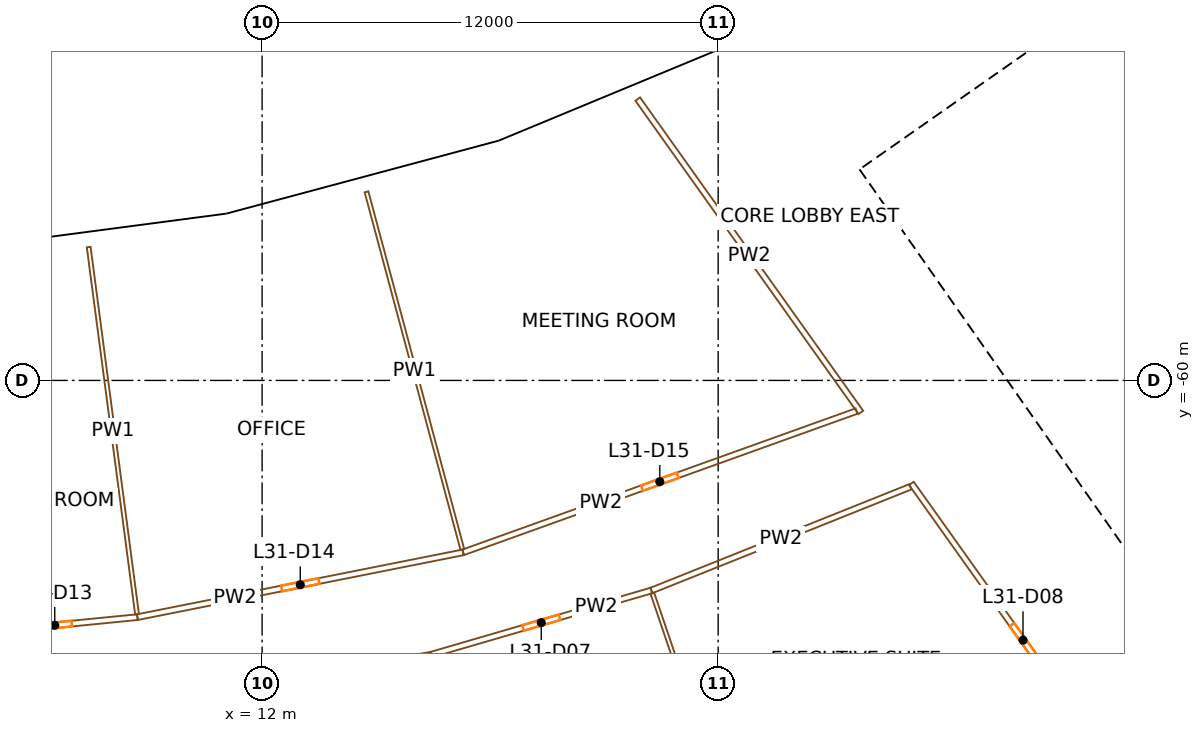
"""IFC4 building model, lengths in metres.
Left out: names, types, materials, properties, quantities, classifications, styles, units other than length and angle.
Written with IfcOpenShell. Run it as: python <this file> out.ifc"""

import sys

from ifc_helpers import new_model, si_unit, direction, frame, frame_2d, origin, origin_2d, place, context, subcontext, project, spatial, rectangle, extrude, element, fill, save


model = new_model("IFC4")
c1 = context("Model", 3, precision=1e-05, world=origin(), true_north=direction((0.0, 1.0)))
c2 = subcontext(c1, "Body", "Model", "MODEL_VIEW")
j1 = project(units=[si_unit("LENGTHUNIT", "METRE"), si_unit("PLANEANGLEUNIT", "RADIAN")], contexts=[c1])
p1 = place(None, origin())
s1 = spatial("IfcSite", under=j1, at=p1, CompositionType="ELEMENT")
p2 = place(p1, origin())
s2 = spatial("IfcBuilding", under=s1, at=p2, CompositionType="ELEMENT")
p3 = place(p2, frame((0.0, 0.0, 136.7)))
s3 = spatial("IfcBuildingStorey", under=s2, at=p3, CompositionType="ELEMENT", Elevation=136.7)
for number, where, z_axis, x_axis in (
    (1, (11.364, -57.131, 0.0), (0.0, 0.0, 1.0), (0.981, 0.195, 0.0)),
    (2, (18.724, -55.159, 0.0), (0.0, 0.0, 1.0), (0.947, 0.321, 0.0)),
    (3, (25.763, -52.243, 0.0), (0.0, 0.0, 1.0), (0.897, 0.442, 0.0)),
):
    element("IfcColumn", number, at=place(p3, frame(where, z_axis=z_axis, x_axis=x_axis)), inside=s3, PredefinedType="COLUMN", context=c2, shape_type="SweptSolid", body=[
        extrude(rectangle(XDim=1.2, YDim=1.5, at=origin_2d()), origin(), (0.0, 0.0, 1.0), 3.8),
    ])
p4 = place(p3, frame((36.717, -66.337, 0.0), z_axis=(0.0, 0.0, 1.0), x_axis=(-0.573577477574, 0.819151315216, 0.0)))
e4 = element("IfcWall", 4, at=p4, inside=s3, PredefinedType="SHEAR", context=c2, shape_type="SweptSolid", body=[
    extrude(rectangle(XDim=14.8, YDim=0.9, at=frame_2d((7.4, 0.0))), origin(), (0.0, 0.0, 1.0), 3.5),
])
p5 = place(p4, frame((6.2, 0.0, 0.0)))
e5 = element("IfcOpeningElement", 5, at=p5, cuts=e4, PredefinedType="OPENING", context=c2, shape_type="SweptSolid", body=[
    extrude(rectangle(XDim=2.4, YDim=2.1, at=frame_2d((1.2, 1.05))), frame((0.0, 0.46, 0.0), z_axis=(0.0, -1.0, 0.0), x_axis=(1.0, 0.0, 0.0)), (0.0, 0.0, 1.0), 0.92),
])
p6 = place(p3, frame((28.854, -54.324, 0.0), z_axis=(0.0, 0.0, 1.0), x_axis=(0.819145767589, 0.573585400304, 0.0)))
e6 = element("IfcWall", 6, at=p6, inside=s3, PredefinedType="SHEAR", context=c2, shape_type="SweptSolid", body=[
    extrude(rectangle(XDim=15.045, YDim=0.9, at=frame_2d((7.523, 0.0))), origin(), (0.0, 0.0, 1.0), 3.5),
])
p7 = place(p6, frame((0.5, 0.0, 0.0)))
e7 = element("IfcOpeningElement", 7, at=p7, cuts=e6, PredefinedType="OPENING", context=c2, shape_type="SweptSolid", body=[
    extrude(rectangle(XDim=1.0, YDim=2.1, at=frame_2d((0.5, 1.05))), frame((0.0, 0.46, 0.0), z_axis=(0.0, -1.0, 0.0), x_axis=(1.0, 0.0, 0.0)), (0.0, 0.0, 1.0), 0.92),
])
p8 = place(p6, frame((2.625, 0.0, 0.0)))
e8 = element("IfcOpeningElement", 8, at=p8, cuts=e6, PredefinedType="OPENING", context=c2, shape_type="SweptSolid", body=[
    extrude(rectangle(XDim=1.0, YDim=2.1, at=frame_2d((0.5, 1.05))), frame((0.0, 0.46, 0.0), z_axis=(0.0, -1.0, 0.0), x_axis=(1.0, 0.0, 0.0)), (0.0, 0.0, 1.0), 0.92),
])
p9 = place(p6, frame((5.625, 0.0, 0.0)))
e9 = element("IfcOpeningElement", 9, at=p9, cuts=e6, PredefinedType="OPENING", context=c2, shape_type="SweptSolid", body=[
    extrude(rectangle(XDim=0.9, YDim=2.1, at=frame_2d((0.45, 1.05))), frame((0.0, 0.46, 0.0), z_axis=(0.0, -1.0, 0.0), x_axis=(1.0, 0.0, 0.0)), (0.0, 0.0, 1.0), 0.92),
])
p10 = place(p6, frame((13.495, 0.0, 0.0)))
e10 = element("IfcOpeningElement", 10, at=p10, cuts=e6, PredefinedType="OPENING", context=c2, shape_type="SweptSolid", body=[
    extrude(rectangle(XDim=1.1, YDim=2.1, at=frame_2d((0.55, 1.05))), frame((0.0, 0.46, 0.0), z_axis=(0.0, -1.0, 0.0), x_axis=(1.0, 0.0, 0.0)), (0.0, 0.0, 1.0), 0.92),
])
p11 = place(p3, frame((31.895, -58.666, 0.0), z_axis=(0.0, 0.0, 1.0), x_axis=(0.819166993208, 0.573555086491, 0.0)))
e11 = element("IfcWall", 11, at=p11, inside=s3, PredefinedType="SOLIDWALL", context=c2, shape_type="SweptSolid", body=[
    extrude(rectangle(XDim=7.95, YDim=0.3, at=frame_2d((3.975, 0.0))), origin(), (0.0, 0.0, 1.0), 3.5),
])
p12 = place(p11, frame((0.675, 0.0, 0.0)))
e12 = element("IfcOpeningElement", 12, at=p12, cuts=e11, PredefinedType="OPENING", context=c2, shape_type="SweptSolid", body=[
    extrude(rectangle(XDim=1.1, YDim=2.1, at=frame_2d((0.55, 1.05))), frame((0.0, 0.16, 0.0), z_axis=(0.0, -1.0, 0.0), x_axis=(1.0, 0.0, 0.0)), (0.0, 0.0, 1.0), 0.32),
])
p13 = place(p11, frame((3.425, 0.0, 0.0)))
e13 = element("IfcOpeningElement", 13, at=p13, cuts=e11, PredefinedType="OPENING", context=c2, shape_type="SweptSolid", body=[
    extrude(rectangle(XDim=1.1, YDim=2.1, at=frame_2d((0.55, 1.05))), frame((0.0, 0.16, 0.0), z_axis=(0.0, -1.0, 0.0), x_axis=(1.0, 0.0, 0.0)), (0.0, 0.0, 1.0), 0.32),
])
p14 = place(p11, frame((6.175, 0.0, 0.0)))
e14 = element("IfcOpeningElement", 14, at=p14, cuts=e11, PredefinedType="OPENING", context=c2, shape_type="SweptSolid", body=[
    extrude(rectangle(XDim=1.1, YDim=2.1, at=frame_2d((0.55, 1.05))), frame((0.0, 0.16, 0.0), z_axis=(0.0, -1.0, 0.0), x_axis=(1.0, 0.0, 0.0)), (0.0, 0.0, 1.0), 0.32),
])
p15 = place(p3, frame((30.461, -56.618, 0.0), z_axis=(0.0, 0.0, 1.0), x_axis=(0.819142461705, 0.573590121456, 0.0)))
e15 = element("IfcWall", 15, at=p15, inside=s3, PredefinedType="SOLIDWALL", context=c2, shape_type="SweptSolid", body=[
    extrude(rectangle(XDim=7.95, YDim=0.3, at=frame_2d((3.975, 0.0))), origin(), (0.0, 0.0, 1.0), 3.5),
])
p16 = place(p3, frame((33.938, -57.052, 0.0), z_axis=(0.0, 0.0, 1.0), x_axis=(-0.573581496053, 0.819148501424, 0.0)))
e16 = element("IfcWall", 16, at=p16, inside=s3, PredefinedType="SOLIDWALL", context=c2, shape_type="SweptSolid", body=[
    extrude(rectangle(XDim=2.2, YDim=0.3, at=frame_2d((1.1, 0.0))), origin(), (0.0, 0.0, 1.0), 3.5),
])
p17 = place(p3, frame((33.787, -61.369, 0.0), z_axis=(0.0, 0.0, 1.0), x_axis=(0.819152564888, 0.573575692858, 0.0)))
e17 = element("IfcWall", 17, at=p17, inside=s3, PredefinedType="SOLIDWALL", context=c2, shape_type="SweptSolid", body=[
    extrude(rectangle(XDim=7.95, YDim=0.3, at=frame_2d((3.975, 0.0))), origin(), (0.0, 0.0, 1.0), 3.5),
])
p18 = place(p17, frame((2.1, 0.0, 0.0)))
e18 = element("IfcOpeningElement", 18, at=p18, cuts=e17, PredefinedType="OPENING", context=c2, shape_type="SweptSolid", body=[
    extrude(rectangle(XDim=1.0, YDim=2.1, at=frame_2d((0.5, 1.05))), frame((0.0, 0.16, 0.0), z_axis=(0.0, -1.0, 0.0), x_axis=(1.0, 0.0, 0.0)), (0.0, 0.0, 1.0), 0.32),
])
p19 = place(p3, frame((32.095, -55.29, 0.0), z_axis=(0.0, 0.0, 1.0), x_axis=(-0.573559170999, 0.819164133348, 0.0)))
e19 = element("IfcWall", 19, at=p19, inside=s3, PredefinedType="PARTITIONING", context=c2, shape_type="SweptSolid", body=[
    extrude(rectangle(XDim=2.2, YDim=0.15, at=frame_2d((1.1, 0.0))), origin(), (0.0, 0.0, 1.0), 3.5),
])
p20 = place(p3, frame((33.774, -54.115, 0.0), z_axis=(0.0, 0.0, 1.0), x_axis=(-0.573581496053, 0.819148501424, 0.0)))
e20 = element("IfcWall", 20, at=p20, inside=s3, PredefinedType="PARTITIONING", context=c2, shape_type="SweptSolid", body=[
    extrude(rectangle(XDim=2.2, YDim=0.15, at=frame_2d((1.1, 0.0))), origin(), (0.0, 0.0, 1.0), 3.5),
])
p21 = place(p3, frame((11.125, -55.804, 0.0), z_axis=(0.0, 0.0, 1.0), x_axis=(-0.991444533306, -0.130528684121, 0.0)))
e21 = element("IfcWall", 21, at=p21, inside=s3, PredefinedType="SOLIDWALL", context=c2, shape_type="SweptSolid", body=[
    extrude(rectangle(XDim=7.493, YDim=0.4, at=frame_2d((3.747, 0.0))), origin(), (0.0, 0.0, 1.0), 2.7),
])
p22 = place(p21, frame((4.301, 0.0, 0.9)))
e22 = element("IfcOpeningElement", 22, at=p22, cuts=e21, PredefinedType="OPENING", context=c2, shape_type="SweptSolid", body=[
    extrude(rectangle(XDim=2.6, YDim=1.65, at=frame_2d((1.3, 0.825))), frame((0.0, 0.21, 0.0), z_axis=(0.0, -1.0, 0.0), x_axis=(1.0, 0.0, 0.0)), (0.0, 0.0, 1.0), 0.42),
])
p23 = place(p21, frame((0.592, 0.0, 0.9)))
e23 = element("IfcOpeningElement", 23, at=p23, cuts=e21, PredefinedType="OPENING", context=c2, shape_type="SweptSolid", body=[
    extrude(rectangle(XDim=2.6, YDim=1.65, at=frame_2d((1.3, 0.825))), frame((0.0, 0.21, 0.0), z_axis=(0.0, -1.0, 0.0), x_axis=(1.0, 0.0, 0.0)), (0.0, 0.0, 1.0), 0.42),
])
p24 = place(p3, frame((18.241, -53.894, 0.0), z_axis=(0.0, 0.0, 1.0), x_axis=(-0.965924597867, -0.258823629594, 0.0)))
e24 = element("IfcWall", 24, at=p24, inside=s3, PredefinedType="SOLIDWALL", context=c2, shape_type="SweptSolid", body=[
    extrude(rectangle(XDim=7.342, YDim=0.4, at=frame_2d((3.671, 0.0))), origin(), (0.0, 0.0, 1.0), 2.7),
])
p25 = place(p24, frame((4.225, 0.0, 0.9)))
e25 = element("IfcOpeningElement", 25, at=p25, cuts=e24, PredefinedType="OPENING", context=c2, shape_type="SweptSolid", body=[
    extrude(rectangle(XDim=2.6, YDim=1.65, at=frame_2d((1.3, 0.825))), frame((0.0, 0.21, 0.0), z_axis=(0.0, -1.0, 0.0), x_axis=(1.0, 0.0, 0.0)), (0.0, 0.0, 1.0), 0.42),
])
p26 = place(p24, frame((0.517, 0.0, 0.9)))
e26 = element("IfcOpeningElement", 26, at=p26, cuts=e24, PredefinedType="OPENING", context=c2, shape_type="SweptSolid", body=[
    extrude(rectangle(XDim=2.6, YDim=1.65, at=frame_2d((1.3, 0.825))), frame((0.0, 0.21, 0.0), z_axis=(0.0, -1.0, 0.0), x_axis=(1.0, 0.0, 0.0)), (0.0, 0.0, 1.0), 0.42),
])
p27 = place(p3, frame((25.189, -51.023, 0.0), z_axis=(0.0, 0.0, 1.0), x_axis=(-0.923879826967, -0.382682721486, 0.0)))
e27 = element("IfcWall", 27, at=p27, inside=s3, PredefinedType="SOLIDWALL", context=c2, shape_type="SweptSolid", body=[
    extrude(rectangle(XDim=7.493, YDim=0.4, at=frame_2d((3.747, 0.0))), origin(), (0.0, 0.0, 1.0), 2.7),
])
p28 = place(p27, frame((4.301, 0.0, 0.9)))
e28 = element("IfcOpeningElement", 28, at=p28, cuts=e27, PredefinedType="OPENING", context=c2, shape_type="SweptSolid", body=[
    extrude(rectangle(XDim=2.6, YDim=1.65, at=frame_2d((1.3, 0.825))), frame((0.0, 0.21, 0.0), z_axis=(0.0, -1.0, 0.0), x_axis=(1.0, 0.0, 0.0)), (0.0, 0.0, 1.0), 0.42),
])
p29 = place(p27, frame((0.592, 0.0, 0.9)))
e29 = element("IfcOpeningElement", 29, at=p29, cuts=e27, PredefinedType="OPENING", context=c2, shape_type="SweptSolid", body=[
    extrude(rectangle(XDim=2.6, YDim=1.65, at=frame_2d((1.3, 0.825))), frame((0.0, 0.21, 0.0), z_axis=(0.0, -1.0, 0.0), x_axis=(1.0, 0.0, 0.0)), (0.0, 0.0, 1.0), 0.42),
])
p30 = place(p3, frame((4.369, -66.657, 0.0), z_axis=(0.0, 0.0, 1.0), x_axis=(0.995184826457, 0.098016127192, 0.0)))
e30 = element("IfcWall", 30, at=p30, inside=s3, PredefinedType="PARTITIONING", context=c2, shape_type="SweptSolid", body=[
    extrude(rectangle(XDim=4.371, YDim=0.15, at=frame_2d((2.186, 0.0))), origin(), (0.0, 0.0, 1.0), 2.4),
])
p31 = place(p30, frame((1.736, 0.0, 0.0)))
e31 = element("IfcOpeningElement", 31, at=p31, cuts=e30, PredefinedType="OPENING", context=c2, shape_type="SweptSolid", body=[
    extrude(rectangle(XDim=0.9, YDim=2.1, at=frame_2d((0.45, 1.05))), frame((0.0, 0.085, 0.0), z_axis=(0.0, -1.0, 0.0), x_axis=(1.0, 0.0, 0.0)), (0.0, 0.0, 1.0), 0.17),
])
p32 = place(p3, frame((7.437, -56.491, 0.0), z_axis=(0.0, 0.0, 1.0), x_axis=(0.13053421433, -0.99144380521, 0.0)))
e32 = element("IfcWall", 32, at=p32, inside=s3, PredefinedType="PARTITIONING", context=c2, shape_type="SweptSolid", body=[
    extrude(rectangle(XDim=9.746, YDim=0.1, at=frame_2d((4.873, 0.0))), origin(), (0.0, 0.0, 1.0), 2.4),
])
p33 = place(p3, frame((16.446, -67.217, 0.0), z_axis=(0.0, 0.0, 1.0), x_axis=(-0.984813412134, -0.173616080133, 0.0)))
e33 = element("IfcWall", 33, at=p33, inside=s3, PredefinedType="PARTITIONING", context=c2, shape_type="SweptSolid", body=[
    extrude(rectangle(XDim=9.052, YDim=0.15, at=frame_2d((4.526, 0.0))), origin(), (0.0, 0.0, 1.0), 2.4),
])
p34 = place(p33, frame((4.026, 0.0, 0.0)))
e34 = element("IfcOpeningElement", 34, at=p34, cuts=e33, PredefinedType="OPENING", context=c2, shape_type="SweptSolid", body=[
    extrude(rectangle(XDim=1.0, YDim=2.1, at=frame_2d((0.5, 1.05))), frame((0.0, 0.085, 0.0), z_axis=(0.0, -1.0, 0.0), x_axis=(1.0, 0.0, 0.0)), (0.0, 0.0, 1.0), 0.17),
])
p35 = place(p3, frame((8.719, -66.229, 0.0), z_axis=(0.0, 0.0, 1.0), x_axis=(0.980786466832, 0.195084357342, 0.0)))
e35 = element("IfcWall", 35, at=p35, inside=s3, PredefinedType="PARTITIONING", context=c2, shape_type="SweptSolid", body=[
    extrude(rectangle(XDim=8.738, YDim=0.15, at=frame_2d((4.369, 0.0))), origin(), (0.0, 0.0, 1.0), 2.4),
])
p36 = place(p35, frame((3.869, 0.0, 0.0)))
e36 = element("IfcOpeningElement", 36, at=p36, cuts=e35, PredefinedType="OPENING", context=c2, shape_type="SweptSolid", body=[
    extrude(rectangle(XDim=1.0, YDim=2.1, at=frame_2d((0.5, 1.05))), frame((0.0, 0.085, 0.0), z_axis=(0.0, -1.0, 0.0), x_axis=(1.0, 0.0, 0.0)), (0.0, 0.0, 1.0), 0.17),
])
p37 = place(p3, frame((14.747, -55.037, 0.0), z_axis=(0.0, 0.0, 1.0), x_axis=(0.258833329344, -0.965921998725, 0.0)))
e37 = element("IfcWall", 37, at=p37, inside=s3, PredefinedType="PARTITIONING", context=c2, shape_type="SweptSolid", body=[
    extrude(rectangle(XDim=9.746, YDim=0.1, at=frame_2d((4.873, 0.0))), origin(), (0.0, 0.0, 1.0), 2.4),
])
p38 = place(p3, frame((22.244, -65.528, 0.0), z_axis=(0.0, 0.0, 1.0), x_axis=(-0.960056580345, -0.279805937279, 0.0)))
e38 = element("IfcWall", 38, at=p38, inside=s3, PredefinedType="PARTITIONING", context=c2, shape_type="SweptSolid", body=[
    extrude(rectangle(XDim=6.039, YDim=0.15, at=frame_2d((3.02, 0.0))), origin(), (0.0, 0.0, 1.0), 2.4),
])
p39 = place(p38, frame((2.52, 0.0, 0.0)))
e39 = element("IfcOpeningElement", 39, at=p39, cuts=e38, PredefinedType="OPENING", context=c2, shape_type="SweptSolid", body=[
    extrude(rectangle(XDim=1.0, YDim=2.1, at=frame_2d((0.5, 1.05))), frame((0.0, 0.085, 0.0), z_axis=(0.0, -1.0, 0.0), x_axis=(1.0, 0.0, 0.0)), (0.0, 0.0, 1.0), 0.17),
])
p40 = place(p3, frame((17.289, -64.524, 0.0), z_axis=(0.0, 0.0, 1.0), x_axis=(0.941150861554, 0.337986768669, 0.0)))
e40 = element("IfcWall", 40, at=p40, inside=s3, PredefinedType="PARTITIONING", context=c2, shape_type="SweptSolid", body=[
    extrude(rectangle(XDim=10.998, YDim=0.15, at=frame_2d((5.499, 0.0))), origin(), (0.0, 0.0, 1.0), 2.4),
])
p41 = place(p40, frame((4.999, 0.0, 0.0)))
e41 = element("IfcOpeningElement", 41, at=p41, cuts=e40, PredefinedType="OPENING", context=c2, shape_type="SweptSolid", body=[
    extrude(rectangle(XDim=1.0, YDim=2.1, at=frame_2d((0.5, 1.05))), frame((0.0, 0.085, 0.0), z_axis=(0.0, -1.0, 0.0), x_axis=(1.0, 0.0, 0.0)), (0.0, 0.0, 1.0), 0.17),
])
p42 = place(p3, frame((21.884, -52.598, 0.0), z_axis=(0.0, 0.0, 1.0), x_axis=(0.580016763963, -0.814604538118, 0.0)))
e42 = element("IfcWall", 42, at=p42, inside=s3, PredefinedType="PARTITIONING", context=c2, shape_type="SweptSolid", body=[
    extrude(rectangle(XDim=10.121, YDim=0.15, at=frame_2d((5.061, 0.0))), origin(), (0.0, 0.0, 1.0), 2.4),
])
p43 = place(p3, frame((22.244, -65.528, 0.0), z_axis=(0.0, 0.0, 1.0), x_axis=(0.92834358791, 0.371723261025, 0.0)))
e43 = element("IfcWall", 43, at=p43, inside=s3, PredefinedType="PARTITIONING", context=c2, shape_type="SweptSolid", body=[
    extrude(rectangle(XDim=7.34, YDim=0.15, at=frame_2d((3.67, 0.0))), origin(), (0.0, 0.0, 1.0), 2.4),
])
p44 = place(p3, frame((25.426, -74.902, 0.0), z_axis=(0.0, 0.0, 1.0), x_axis=(-0.3214264651, 0.94693454237, 0.0)))
e44 = element("IfcWall", 44, at=p44, inside=s3, PredefinedType="PARTITIONING", context=c2, shape_type="SweptSolid", body=[
    extrude(rectangle(XDim=9.825, YDim=0.1, at=frame_2d((4.912, 0.0))), origin(), (0.0, 0.0, 1.0), 2.4),
])
p45 = place(p3, frame((34.958, -70.959, 0.0), z_axis=(0.0, 0.0, 1.0), x_axis=(-0.580031092611, 0.814594335608, 0.0)))
e45 = element("IfcWall", 45, at=p45, inside=s3, PredefinedType="PARTITIONING", context=c2, shape_type="SweptSolid", body=[
    extrude(rectangle(XDim=10.126, YDim=0.15, at=frame_2d((5.063, 0.0))), origin(), (0.0, 0.0, 1.0), 2.4),
])
p46 = place(p45, frame((4.563, 0.0, 0.0)))
e46 = element("IfcOpeningElement", 46, at=p46, cuts=e45, PredefinedType="OPENING", context=c2, shape_type="SweptSolid", body=[
    extrude(rectangle(XDim=1.0, YDim=2.1, at=frame_2d((0.5, 1.05))), frame((0.0, 0.085, 0.0), z_axis=(0.0, -1.0, 0.0), x_axis=(1.0, 0.0, 0.0)), (0.0, 0.0, 1.0), 0.17),
])
p47 = place(p5, origin())
e47 = element("IfcDoor", 47, at=p47, inside=s3, OperationType="DOUBLE_DOOR_SINGLE_SWING", PredefinedType="DOOR", context=c2, shape_type="SweptSolid", body=[
    extrude(rectangle(XDim=2.4, YDim=2.1, at=frame_2d((1.2, 1.05))), frame((0.0, 0.025, 0.0), z_axis=(0.0, -1.0, 0.0), x_axis=(1.0, 0.0, 0.0)), (0.0, 0.0, 1.0), 0.05),
])
fill(e5, e47)
p48 = place(p12, origin())
e48 = element("IfcDoor", 48, at=p48, inside=s3, OperationType="DOUBLE_DOOR_SLIDING", PredefinedType="DOOR", context=c2, shape_type="SweptSolid", body=[
    extrude(rectangle(XDim=1.1, YDim=2.1, at=frame_2d((0.55, 1.05))), frame((0.0, 0.025, 0.0), z_axis=(0.0, -1.0, 0.0), x_axis=(1.0, 0.0, 0.0)), (0.0, 0.0, 1.0), 0.05),
])
fill(e12, e48)
p49 = place(p13, origin())
e49 = element("IfcDoor", 49, at=p49, inside=s3, OperationType="DOUBLE_DOOR_SLIDING", PredefinedType="DOOR", context=c2, shape_type="SweptSolid", body=[
    extrude(rectangle(XDim=1.1, YDim=2.1, at=frame_2d((0.55, 1.05))), frame((0.0, 0.025, 0.0), z_axis=(0.0, -1.0, 0.0), x_axis=(1.0, 0.0, 0.0)), (0.0, 0.0, 1.0), 0.05),
])
fill(e13, e49)
p50 = place(p7, origin())
e50 = element("IfcDoor", 50, at=p50, inside=s3, OperationType="SINGLE_SWING_RIGHT", PredefinedType="DOOR", context=c2, shape_type="SweptSolid", body=[
    extrude(rectangle(XDim=1.0, YDim=2.1, at=frame_2d((0.5, 1.05))), frame((0.0, 0.025, 0.0), z_axis=(0.0, -1.0, 0.0), x_axis=(1.0, 0.0, 0.0)), (0.0, 0.0, 1.0), 0.05),
])
fill(e7, e50)
p51 = place(p8, origin())
e51 = element("IfcDoor", 51, at=p51, inside=s3, OperationType="SINGLE_SWING_LEFT", PredefinedType="DOOR", context=c2, shape_type="SweptSolid", body=[
    extrude(rectangle(XDim=1.0, YDim=2.1, at=frame_2d((0.5, 1.05))), frame((0.0, 0.025, 0.0), z_axis=(0.0, -1.0, 0.0), x_axis=(1.0, 0.0, 0.0)), (0.0, 0.0, 1.0), 0.05),
])
fill(e8, e51)
p52 = place(p22, origin())
e52 = element("IfcWindow", 52, at=p52, inside=s3, PartitioningType="SINGLE_PANEL", PredefinedType="WINDOW", context=c2, shape_type="SweptSolid", body=[
    extrude(rectangle(XDim=2.6, YDim=1.65, at=frame_2d((1.3, 0.825))), frame((0.0, 0.03, 0.0), z_axis=(0.0, -1.0, 0.0), x_axis=(1.0, 0.0, 0.0)), (0.0, 0.0, 1.0), 0.06),
])
fill(e22, e52)
p53 = place(p23, origin())
e53 = element("IfcWindow", 53, at=p53, inside=s3, PartitioningType="SINGLE_PANEL", PredefinedType="WINDOW", context=c2, shape_type="SweptSolid", body=[
    extrude(rectangle(XDim=2.6, YDim=1.65, at=frame_2d((1.3, 0.825))), frame((0.0, 0.03, 0.0), z_axis=(0.0, -1.0, 0.0), x_axis=(1.0, 0.0, 0.0)), (0.0, 0.0, 1.0), 0.06),
])
fill(e23, e53)
p54 = place(p25, origin())
e54 = element("IfcWindow", 54, at=p54, inside=s3, PartitioningType="SINGLE_PANEL", PredefinedType="WINDOW", context=c2, shape_type="SweptSolid", body=[
    extrude(rectangle(XDim=2.6, YDim=1.65, at=frame_2d((1.3, 0.825))), frame((0.0, 0.03, 0.0), z_axis=(0.0, -1.0, 0.0), x_axis=(1.0, 0.0, 0.0)), (0.0, 0.0, 1.0), 0.06),
])
fill(e25, e54)
p55 = place(p26, origin())
e55 = element("IfcWindow", 55, at=p55, inside=s3, PartitioningType="SINGLE_PANEL", PredefinedType="WINDOW", context=c2, shape_type="SweptSolid", body=[
    extrude(rectangle(XDim=2.6, YDim=1.65, at=frame_2d((1.3, 0.825))), frame((0.0, 0.03, 0.0), z_axis=(0.0, -1.0, 0.0), x_axis=(1.0, 0.0, 0.0)), (0.0, 0.0, 1.0), 0.06),
])
fill(e26, e55)
p56 = place(p28, origin())
e56 = element("IfcWindow", 56, at=p56, inside=s3, PartitioningType="SINGLE_PANEL", PredefinedType="WINDOW", context=c2, shape_type="SweptSolid", body=[
    extrude(rectangle(XDim=2.6, YDim=1.65, at=frame_2d((1.3, 0.825))), frame((0.0, 0.03, 0.0), z_axis=(0.0, -1.0, 0.0), x_axis=(1.0, 0.0, 0.0)), (0.0, 0.0, 1.0), 0.06),
])
fill(e28, e56)
p57 = place(p29, origin())
e57 = element("IfcWindow", 57, at=p57, inside=s3, PartitioningType="SINGLE_PANEL", PredefinedType="WINDOW", context=c2, shape_type="SweptSolid", body=[
    extrude(rectangle(XDim=2.6, YDim=1.65, at=frame_2d((1.3, 0.825))), frame((0.0, 0.03, 0.0), z_axis=(0.0, -1.0, 0.0), x_axis=(1.0, 0.0, 0.0)), (0.0, 0.0, 1.0), 0.06),
])
fill(e29, e57)
p58 = place(p39, origin())
e58 = element("IfcDoor", 58, at=p58, inside=s3, OperationType="SINGLE_SWING_RIGHT", PredefinedType="DOOR", context=c2, shape_type="SweptSolid", body=[
    extrude(rectangle(XDim=1.0, YDim=2.1, at=frame_2d((0.5, 1.05))), frame((0.0, 0.025, 0.0), z_axis=(0.0, -1.0, 0.0), x_axis=(1.0, 0.0, 0.0)), (0.0, 0.0, 1.0), 0.05),
])
fill(e39, e58)
p59 = place(p46, origin())
e59 = element("IfcDoor", 59, at=p59, inside=s3, OperationType="SINGLE_SWING_RIGHT", PredefinedType="DOOR", context=c2, shape_type="SweptSolid", body=[
    extrude(rectangle(XDim=1.0, YDim=2.1, at=frame_2d((0.5, 1.05))), frame((0.0, 0.025, 0.0), z_axis=(0.0, -1.0, 0.0), x_axis=(1.0, 0.0, 0.0)), (0.0, 0.0, 1.0), 0.05),
])
fill(e46, e59)
p60 = place(p31, origin())
e60 = element("IfcDoor", 60, at=p60, inside=s3, OperationType="SINGLE_SWING_RIGHT", PredefinedType="DOOR", context=c2, shape_type="SweptSolid", body=[
    extrude(rectangle(XDim=0.9, YDim=2.1, at=frame_2d((0.45, 1.05))), frame((0.0, 0.025, 0.0), z_axis=(0.0, -1.0, 0.0), x_axis=(1.0, 0.0, 0.0)), (0.0, 0.0, 1.0), 0.05),
])
fill(e31, e60)
p61 = place(p36, origin())
e61 = element("IfcDoor", 61, at=p61, inside=s3, OperationType="SINGLE_SWING_RIGHT", PredefinedType="DOOR", context=c2, shape_type="SweptSolid", body=[
    extrude(rectangle(XDim=1.0, YDim=2.1, at=frame_2d((0.5, 1.05))), frame((0.0, 0.025, 0.0), z_axis=(0.0, -1.0, 0.0), x_axis=(1.0, 0.0, 0.0)), (0.0, 0.0, 1.0), 0.05),
])
fill(e36, e61)
p62 = place(p41, origin())
e62 = element("IfcDoor", 62, at=p62, inside=s3, OperationType="SINGLE_SWING_RIGHT", PredefinedType="DOOR", context=c2, shape_type="SweptSolid", body=[
    extrude(rectangle(XDim=1.0, YDim=2.1, at=frame_2d((0.5, 1.05))), frame((0.0, 0.025, 0.0), z_axis=(0.0, -1.0, 0.0), x_axis=(1.0, 0.0, 0.0)), (0.0, 0.0, 1.0), 0.05),
])
fill(e41, e62)
save(model, sys.argv[1])
